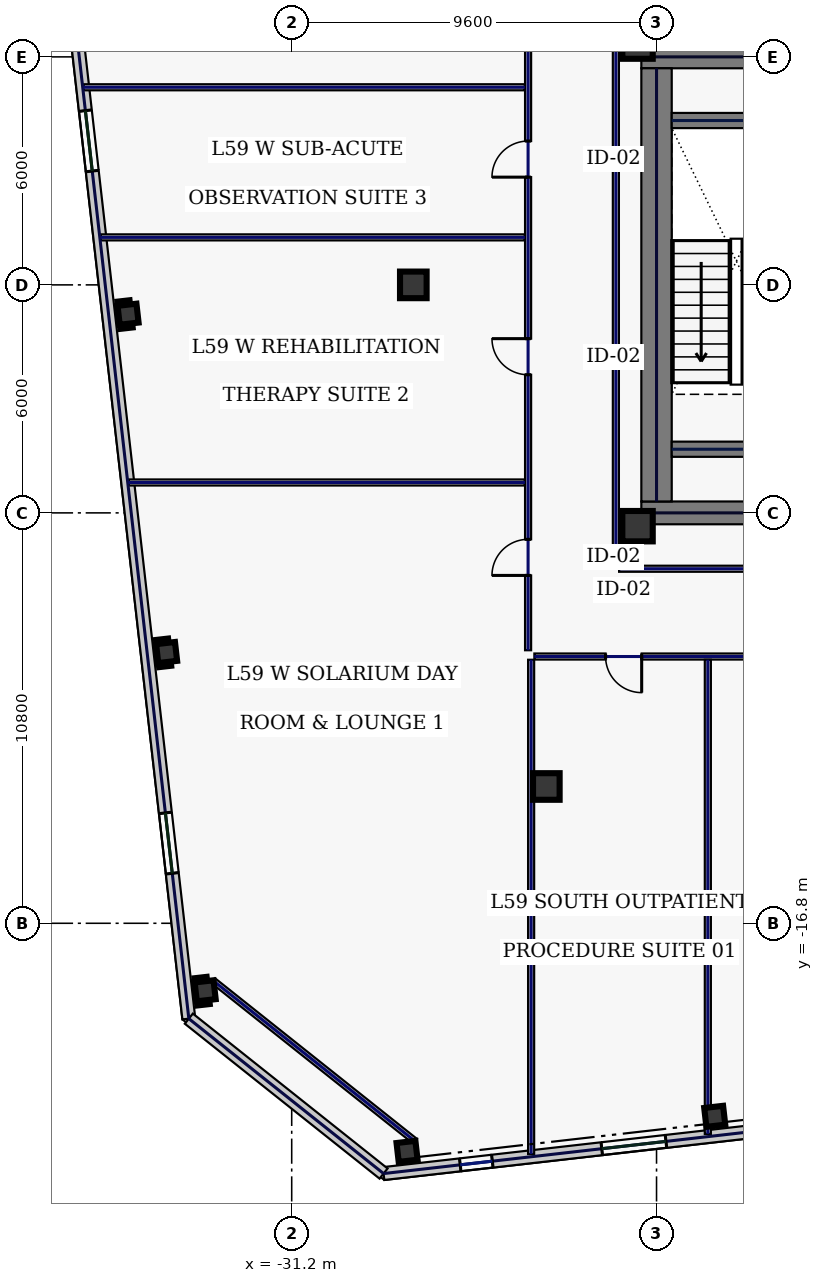
"""IFC4 building model, lengths in metres.
Left out: names, types, materials, properties, quantities, classifications, styles, units other than length and angle.
Written with IfcOpenShell. Run it as: python <this file> out.ifc"""

import sys

from ifc_helpers import new_model, si_unit, direction, frame, frame_2d, origin, origin_2d, place, context, subcontext, project, spatial, rectangle, hollow_rectangle, extrude, element, fill, save


model = new_model("IFC4")
c1 = context("Model", 3, precision=1e-05, world=origin(), true_north=direction((0.0, 1.0)))
c2 = subcontext(c1, "Body", "Model", "MODEL_VIEW")
j1 = project(units=[si_unit("LENGTHUNIT", "METRE"), si_unit("PLANEANGLEUNIT", "RADIAN")], contexts=[c1])
p1 = place(None, origin())
s1 = spatial("IfcSite", under=j1, at=p1, CompositionType="ELEMENT")
p2 = place(p1, origin())
s2 = spatial("IfcBuilding", under=s1, at=p2, CompositionType="ELEMENT")
p3 = place(p2, frame((0.0, 0.0, 255.0)))
s3 = spatial("IfcBuildingStorey", under=s2, at=p3, CompositionType="ELEMENT", Elevation=255.0)
for number, where, z_axis, x_axis in (
    (1, (-22.0, 6.0, 0.0), (0.0, 0.0, 1.0), (1.0, 0.0, 0.0)),
    (2, (-22.0, -6.0, 0.0), (0.0, 0.0, 1.0), (1.0, 0.0, 0.0)),
):
    element("IfcWall", number, at=place(p3, frame(where, z_axis=z_axis, x_axis=x_axis)), inside=s3, PredefinedType="SHEAR", context=c2, shape_type="SweptSolid", body=[
        extrude(rectangle(XDim=11.5, YDim=0.6, at=frame_2d((5.75, 0.0))), origin(), (0.0, 0.0, 1.0), 3.74),
    ])
p4 = place(p3, frame((-21.6, -5.7, 0.0), z_axis=(0.0, 0.0, 1.0), x_axis=(0.0, 1.0, 0.0)))
e3 = element("IfcWall", 3, at=p4, inside=s3, PredefinedType="SHEAR", context=c2, shape_type="SweptSolid", body=[
    extrude(rectangle(XDim=11.4, YDim=0.8, at=frame_2d((5.7, 0.0))), origin(), (0.0, 0.0, 1.0), 3.74),
])
for number, where, z_axis, x_axis in (
    (4, (-21.2, -4.325, 0.0), (0.0, 0.0, 1.0), (1.0, 0.0, 0.0)),
    (5, (-21.2, 4.325, 0.0), (0.0, 0.0, 1.0), (1.0, 0.0, 0.0)),
):
    element("IfcWall", number, at=place(p3, frame(where, z_axis=z_axis, x_axis=x_axis)), inside=s3, PredefinedType="SHEAR", context=c2, shape_type="SweptSolid", body=[
        extrude(rectangle(XDim=3.4, YDim=0.4, at=frame_2d((1.7, 0.0))), origin(), (0.0, 0.0, 1.0), 3.74),
    ])
for number, where, z_axis, x_axis in (
    (6, (-22.1, -6.35, 0.0), (0.0, 0.0, 1.0), (1.0, 0.0, 0.0)),
    (7, (-22.1, 6.35, 0.0), (0.0, 0.0, 1.0), (1.0, 0.0, 0.0)),
):
    element("IfcColumn", number, at=place(p3, frame(where, z_axis=z_axis, x_axis=x_axis)), inside=s3, PredefinedType="COLUMN", context=c2, shape_type="SweptSolid", body=[
        extrude(hollow_rectangle(XDim=0.8, YDim=0.8, WallThickness=0.036, at=origin_2d()), origin(), (0.0, 0.0, 1.0), 3.74),
    ])
for number, where, z_axis, x_axis in (
    (8, (-24.5, -13.2, 0.0), (0.0, 0.0, 1.0), (1.0, 0.0, 0.0)),
    (9, (-28.0, 0.0, 0.0), (0.0, 0.0, 1.0), (1.0, 0.0, 0.0)),
):
    element("IfcColumn", number, at=place(p3, frame(where, z_axis=z_axis, x_axis=x_axis)), inside=s3, PredefinedType="COLUMN", context=c2, shape_type="SweptSolid", body=[
        extrude(hollow_rectangle(XDim=0.7, YDim=0.7, WallThickness=0.032, at=origin_2d()), origin(), (0.0, 0.0, 1.0), 3.74),
    ])
for number, where, z_axis, x_axis in (
    (10, (-28.165, -22.802, 0.0), (0.0, 0.0, 1.0), (0.994, 0.113, 0.0)),
    (11, (-20.069, -21.88, 0.0), (0.0, 0.0, 1.0), (0.994, 0.113, 0.0)),
    (12, (-35.506, -0.772, 0.0), (0.0, 0.0, 1.0), (0.994, 0.113, 0.0)),
    (13, (-34.491, -9.674, 0.0), (0.0, 0.0, 1.0), (0.994, 0.113, 0.0)),
    (14, (-33.477, -18.577, 0.0), (0.0, 0.0, 1.0), (0.994, 0.113, 0.0)),
):
    element("IfcColumn", number, at=place(p3, frame(where, z_axis=z_axis, x_axis=x_axis)), inside=s3, PredefinedType="COLUMN", context=c2, shape_type="SweptSolid", body=[
        extrude(hollow_rectangle(XDim=0.5, YDim=0.5, WallThickness=0.025, at=origin_2d()), origin(), (0.0, 0.0, 1.0), 3.74),
    ])
p5 = place(p3, frame((-28.783, -23.386, 0.0), z_axis=(0.0, 0.0, 1.0), x_axis=(0.993572271362, 0.113199565282, 0.0)))
e15 = element("IfcWall", 15, at=p5, inside=s3, PredefinedType="STANDARD", context=c2, shape_type="SweptSolid", body=[
    extrude(rectangle(XDim=18.651, YDim=0.34, at=frame_2d((9.326, 0.0))), origin(), (0.0, 0.0, 1.0), 3.74),
])
p6 = place(p5, frame((2.03, 0.0, 0.88)))
e16 = element("IfcOpeningElement", 16, at=p6, cuts=e15, PredefinedType="OPENING", context=c2, shape_type="SweptSolid", body=[
    extrude(rectangle(XDim=0.85, YDim=1.85, at=frame_2d((0.425, 0.925))), frame((0.0, 0.18, 0.0), z_axis=(0.0, -1.0, 0.0), x_axis=(1.0, 0.0, 0.0)), (0.0, 0.0, 1.0), 0.36),
])
p7 = place(p5, frame((5.779, 0.0, 0.88)))
e17 = element("IfcOpeningElement", 17, at=p7, cuts=e15, PredefinedType="OPENING", context=c2, shape_type="SweptSolid", body=[
    extrude(rectangle(XDim=1.7, YDim=1.95, at=frame_2d((0.85, 0.975))), frame((0.0, 0.18, 0.0), z_axis=(0.0, -1.0, 0.0), x_axis=(1.0, 0.0, 0.0)), (0.0, 0.0, 1.0), 0.36),
])
p8 = place(p5, frame((10.179, 0.0, 0.88)))
e18 = element("IfcOpeningElement", 18, at=p8, cuts=e15, PredefinedType="OPENING", context=c2, shape_type="SweptSolid", body=[
    extrude(rectangle(XDim=1.7, YDim=1.95, at=frame_2d((0.85, 0.975))), frame((0.0, 0.18, 0.0), z_axis=(0.0, -1.0, 0.0), x_axis=(1.0, 0.0, 0.0)), (0.0, 0.0, 1.0), 0.36),
])
p9 = place(p5, frame((13.927, 0.0, 0.88)))
e19 = element("IfcOpeningElement", 19, at=p9, cuts=e15, PredefinedType="OPENING", context=c2, shape_type="SweptSolid", body=[
    extrude(rectangle(XDim=1.7, YDim=1.95, at=frame_2d((0.85, 0.975))), frame((0.0, 0.18, 0.0), z_axis=(0.0, -1.0, 0.0), x_axis=(1.0, 0.0, 0.0)), (0.0, 0.0, 1.0), 0.36),
])
p10 = place(p3, frame((-38.118, 17.651, 0.0), z_axis=(0.0, 0.0, 1.0), x_axis=(0.11320360501, -0.9935718111, 0.0)))
e20 = element("IfcWall", 20, at=p10, inside=s3, PredefinedType="STANDARD", context=c2, shape_type="SweptSolid", body=[
    extrude(rectangle(XDim=37.2, YDim=0.34, at=frame_2d((18.6, 0.0))), origin(), (0.0, 0.0, 1.0), 3.74),
])
p11 = place(p10, frame((3.85, 0.0, 0.58)))
e21 = element("IfcOpeningElement", 21, at=p11, cuts=e20, PredefinedType="OPENING", context=c2, shape_type="SweptSolid", body=[
    extrude(rectangle(XDim=1.6, YDim=2.3, at=frame_2d((0.8, 1.15))), frame((0.0, 0.18, 0.0), z_axis=(0.0, -1.0, 0.0), x_axis=(1.0, 0.0, 0.0)), (0.0, 0.0, 1.0), 0.36),
])
p12 = place(p10, frame((13.15, 0.0, 0.58)))
e22 = element("IfcOpeningElement", 22, at=p12, cuts=e20, PredefinedType="OPENING", context=c2, shape_type="SweptSolid", body=[
    extrude(rectangle(XDim=1.6, YDim=2.3, at=frame_2d((0.8, 1.15))), frame((0.0, 0.18, 0.0), z_axis=(0.0, -1.0, 0.0), x_axis=(1.0, 0.0, 0.0)), (0.0, 0.0, 1.0), 0.36),
])
p13 = place(p10, frame((31.75, 0.0, 0.58)))
e23 = element("IfcOpeningElement", 23, at=p13, cuts=e20, PredefinedType="OPENING", context=c2, shape_type="SweptSolid", body=[
    extrude(rectangle(XDim=1.6, YDim=2.3, at=frame_2d((0.8, 1.15))), frame((0.0, 0.18, 0.0), z_axis=(0.0, -1.0, 0.0), x_axis=(1.0, 0.0, 0.0)), (0.0, 0.0, 1.0), 0.36),
])
p14 = place(p3, frame((-33.907, -19.31, 0.0), z_axis=(0.0, 0.0, 1.0), x_axis=(0.782611787794, -0.622510071892, 0.0)))
e24 = element("IfcWall", 24, at=p14, inside=s3, PredefinedType="STANDARD", context=c2, shape_type="SweptSolid", body=[
    extrude(rectangle(XDim=6.548, YDim=0.34, at=frame_2d((3.274, 0.0))), origin(), (0.0, 0.0, 1.0), 3.74),
])
p15 = place(p3, frame((-33.265, -18.311, 0.0), z_axis=(0.0, 0.0, 1.0), x_axis=(0.782602647064, -0.622521563328, 0.0)))
e25 = element("IfcWall", 25, at=p15, inside=s3, PredefinedType="PARTITIONING", context=c2, shape_type="SweptSolid", body=[
    extrude(rectangle(XDim=6.788, YDim=0.16, at=frame_2d((3.394, 0.0))), origin(), (0.0, 0.0, 1.0), 3.74),
])
p16 = place(p3, frame((-24.98, -9.615, 0.0), z_axis=(0.0, 0.0, 1.0), x_axis=(0.0, 1.0, 0.0)))
e26 = element("IfcWall", 26, at=p16, inside=s3, PredefinedType="PARTITIONING", context=c2, shape_type="SweptSolid", body=[
    extrude(rectangle(XDim=19.28, YDim=0.16, at=frame_2d((9.64, 0.0))), origin(), (0.0, 0.0, 1.0), 3.74),
])
p17 = place(p16, frame((1.969, 0.0, 0.0)))
e27 = element("IfcOpeningElement", 27, at=p17, cuts=e26, PredefinedType="OPENING", context=c2, shape_type="SweptSolid", body=[
    extrude(rectangle(XDim=0.95, YDim=2.2, at=frame_2d((0.475, 1.1))), frame((0.0, 0.09, 0.0), z_axis=(0.0, -1.0, 0.0), x_axis=(1.0, 0.0, 0.0)), (0.0, 0.0, 1.0), 0.18),
])
p18 = place(p16, frame((7.25, 0.0, 0.0)))
e28 = element("IfcOpeningElement", 28, at=p18, cuts=e26, PredefinedType="OPENING", context=c2, shape_type="SweptSolid", body=[
    extrude(rectangle(XDim=0.95, YDim=2.2, at=frame_2d((0.475, 1.1))), frame((0.0, 0.09, 0.0), z_axis=(0.0, -1.0, 0.0), x_axis=(1.0, 0.0, 0.0)), (0.0, 0.0, 1.0), 0.18),
])
p19 = place(p16, frame((12.45, 0.0, 0.0)))
e29 = element("IfcOpeningElement", 29, at=p19, cuts=e26, PredefinedType="OPENING", context=c2, shape_type="SweptSolid", body=[
    extrude(rectangle(XDim=0.95, YDim=2.2, at=frame_2d((0.475, 1.1))), frame((0.0, 0.09, 0.0), z_axis=(0.0, -1.0, 0.0), x_axis=(1.0, 0.0, 0.0)), (0.0, 0.0, 1.0), 0.18),
])
p20 = place(p16, frame((16.506, 0.0, 0.0)))
e30 = element("IfcOpeningElement", 30, at=p20, cuts=e26, PredefinedType="OPENING", context=c2, shape_type="SweptSolid", body=[
    extrude(rectangle(XDim=0.95, YDim=2.2, at=frame_2d((0.475, 1.1))), frame((0.0, 0.09, 0.0), z_axis=(0.0, -1.0, 0.0), x_axis=(1.0, 0.0, 0.0)), (0.0, 0.0, 1.0), 0.18),
])
p21 = place(p3, frame((-15.065, -9.78, 0.0), z_axis=(0.0, 0.0, 1.0), x_axis=(-1.0, 0.0, 0.0)))
e31 = element("IfcWall", 31, at=p21, inside=s3, PredefinedType="PARTITIONING", context=c2, shape_type="SweptSolid", body=[
    extrude(rectangle(XDim=9.75, YDim=0.16, at=frame_2d((4.875, 0.0))), origin(), (0.0, 0.0, 1.0), 3.74),
])
p22 = place(p21, frame((6.926, 0.0, 0.0)))
e32 = element("IfcOpeningElement", 32, at=p22, cuts=e31, PredefinedType="OPENING", context=c2, shape_type="SweptSolid", body=[
    extrude(rectangle(XDim=0.95, YDim=2.2, at=frame_2d((0.475, 1.1))), frame((0.0, 0.09, 0.0), z_axis=(0.0, -1.0, 0.0), x_axis=(1.0, 0.0, 0.0)), (0.0, 0.0, 1.0), 0.18),
])
p23 = place(p21, frame((2.354, 0.0, 0.0)))
e33 = element("IfcOpeningElement", 33, at=p23, cuts=e31, PredefinedType="OPENING", context=c2, shape_type="SweptSolid", body=[
    extrude(rectangle(XDim=0.95, YDim=2.2, at=frame_2d((0.475, 1.1))), frame((0.0, 0.09, 0.0), z_axis=(0.0, -1.0, 0.0), x_axis=(1.0, 0.0, 0.0)), (0.0, 0.0, 1.0), 0.18),
])
p24 = place(p3, frame((-22.67, 7.435, 0.0), z_axis=(0.0, 0.0, 1.0), x_axis=(0.0, -1.0, 0.0)))
e34 = element("IfcWall", 34, at=p24, inside=s3, PredefinedType="PARTITIONING", context=c2, shape_type="SweptSolid", body=[
    extrude(rectangle(XDim=14.82, YDim=0.16, at=frame_2d((7.41, 0.0))), origin(), (0.0, 0.0, 1.0), 3.74),
])
p25 = place(p3, frame((-22.585, -7.47, 0.0), z_axis=(0.0, 0.0, 1.0), x_axis=(1.0, 0.0, 0.0)))
e35 = element("IfcWall", 35, at=p25, inside=s3, PredefinedType="PARTITIONING", context=c2, shape_type="SweptSolid", body=[
    extrude(rectangle(XDim=11.87, YDim=0.16, at=frame_2d((5.935, 0.0))), origin(), (0.0, 0.0, 1.0), 3.74),
])
p26 = place(p3, frame((-24.9, -22.873, 0.0), z_axis=(0.0, 0.0, 1.0), x_axis=(0.0, 1.0, 0.0)))
e36 = element("IfcWall", 36, at=p26, inside=s3, PredefinedType="PARTITIONING", context=c2, shape_type="SweptSolid", body=[
    extrude(rectangle(XDim=13.008, YDim=0.16, at=frame_2d((6.504, 0.0))), origin(), (0.0, 0.0, 1.0), 3.74),
])
p27 = place(p3, frame((-20.25, -22.344, 0.0), z_axis=(0.0, 0.0, 1.0), x_axis=(0.0, 1.0, 0.0)))
e37 = element("IfcWall", 37, at=p27, inside=s3, PredefinedType="PARTITIONING", context=c2, shape_type="SweptSolid", body=[
    extrude(rectangle(XDim=12.479, YDim=0.16, at=frame_2d((6.239, 0.0))), origin(), (0.0, 0.0, 1.0), 3.74),
])
p28 = place(p3, frame((-35.494, -5.2, 0.0), z_axis=(0.0, 0.0, 1.0), x_axis=(1.0, 0.0, 0.0)))
e38 = element("IfcWall", 38, at=p28, inside=s3, PredefinedType="PARTITIONING", context=c2, shape_type="SweptSolid", body=[
    extrude(rectangle(XDim=10.429, YDim=0.16, at=frame_2d((5.215, 0.0))), origin(), (0.0, 0.0, 1.0), 3.74),
])
p29 = place(p3, frame((-36.229, 1.25, 0.0), z_axis=(0.0, 0.0, 1.0), x_axis=(1.0, 0.0, 0.0)))
e39 = element("IfcWall", 39, at=p29, inside=s3, PredefinedType="PARTITIONING", context=c2, shape_type="SweptSolid", body=[
    extrude(rectangle(XDim=11.165, YDim=0.16, at=frame_2d((5.582, 0.0))), origin(), (0.0, 0.0, 1.0), 3.74),
])
p30 = place(p3, frame((-36.679, 5.2, 0.0), z_axis=(0.0, 0.0, 1.0), x_axis=(1.0, 0.0, 0.0)))
e40 = element("IfcWall", 40, at=p30, inside=s3, PredefinedType="PARTITIONING", context=c2, shape_type="SweptSolid", body=[
    extrude(rectangle(XDim=11.615, YDim=0.16, at=frame_2d((5.807, 0.0))), origin(), (0.0, 0.0, 1.0), 3.74),
])
p31 = place(p6, origin())
e41 = element("IfcWindow", 41, at=p31, inside=s3, PartitioningType="SINGLE_PANEL", PredefinedType="WINDOW", context=c2, shape_type="SweptSolid", body=[
    extrude(rectangle(XDim=0.85, YDim=1.85, at=frame_2d((0.425, 0.925))), frame((0.0, 0.03, 0.0), z_axis=(0.0, -1.0, 0.0), x_axis=(1.0, 0.0, 0.0)), (0.0, 0.0, 1.0), 0.06),
])
fill(e16, e41)
p32 = place(p7, origin())
e42 = element("IfcWindow", 42, at=p32, inside=s3, PartitioningType="SINGLE_PANEL", PredefinedType="WINDOW", context=c2, shape_type="SweptSolid", body=[
    extrude(rectangle(XDim=1.7, YDim=1.95, at=frame_2d((0.85, 0.975))), frame((0.0, 0.03, 0.0), z_axis=(0.0, -1.0, 0.0), x_axis=(1.0, 0.0, 0.0)), (0.0, 0.0, 1.0), 0.06),
])
fill(e17, e42)
p33 = place(p12, origin())
e43 = element("IfcWindow", 43, at=p33, inside=s3, PartitioningType="SINGLE_PANEL", PredefinedType="WINDOW", context=c2, shape_type="SweptSolid", body=[
    extrude(rectangle(XDim=1.6, YDim=2.3, at=frame_2d((0.8, 1.15))), frame((0.0, 0.03, 0.0), z_axis=(0.0, -1.0, 0.0), x_axis=(1.0, 0.0, 0.0)), (0.0, 0.0, 1.0), 0.06),
])
fill(e22, e43)
p34 = place(p13, origin())
e44 = element("IfcWindow", 44, at=p34, inside=s3, PartitioningType="SINGLE_PANEL", PredefinedType="WINDOW", context=c2, shape_type="SweptSolid", body=[
    extrude(rectangle(XDim=1.6, YDim=2.3, at=frame_2d((0.8, 1.15))), frame((0.0, 0.03, 0.0), z_axis=(0.0, -1.0, 0.0), x_axis=(1.0, 0.0, 0.0)), (0.0, 0.0, 1.0), 0.06),
])
fill(e23, e44)
p35 = place(p22, origin())
e45 = element("IfcDoor", 45, at=p35, inside=s3, OperationType="SINGLE_SWING_LEFT", PredefinedType="DOOR", context=c2, shape_type="SweptSolid", body=[
    extrude(rectangle(XDim=0.95, YDim=2.2, at=frame_2d((0.475, 1.1))), frame((0.0, 0.025, 0.0), z_axis=(0.0, -1.0, 0.0), x_axis=(1.0, 0.0, 0.0)), (0.0, 0.0, 1.0), 0.05),
])
fill(e32, e45)
p36 = place(p17, origin())
e46 = element("IfcDoor", 46, at=p36, inside=s3, OperationType="SINGLE_SWING_LEFT", PredefinedType="DOOR", context=c2, shape_type="SweptSolid", body=[
    extrude(rectangle(XDim=0.95, YDim=2.2, at=frame_2d((0.475, 1.1))), frame((0.0, 0.025, 0.0), z_axis=(0.0, -1.0, 0.0), x_axis=(1.0, 0.0, 0.0)), (0.0, 0.0, 1.0), 0.05),
])
fill(e27, e46)
p37 = place(p18, origin())
e47 = element("IfcDoor", 47, at=p37, inside=s3, OperationType="SINGLE_SWING_RIGHT", PredefinedType="DOOR", context=c2, shape_type="SweptSolid", body=[
    extrude(rectangle(XDim=0.95, YDim=2.2, at=frame_2d((0.475, 1.1))), frame((0.0, 0.025, 0.0), z_axis=(0.0, -1.0, 0.0), x_axis=(1.0, 0.0, 0.0)), (0.0, 0.0, 1.0), 0.05),
])
fill(e28, e47)
p38 = place(p19, origin())
e48 = element("IfcDoor", 48, at=p38, inside=s3, OperationType="SINGLE_SWING_LEFT", PredefinedType="DOOR", context=c2, shape_type="SweptSolid", body=[
    extrude(rectangle(XDim=0.95, YDim=2.2, at=frame_2d((0.475, 1.1))), frame((0.0, 0.025, 0.0), z_axis=(0.0, -1.0, 0.0), x_axis=(1.0, 0.0, 0.0)), (0.0, 0.0, 1.0), 0.05),
])
fill(e29, e48)
save(model, sys.argv[1])
